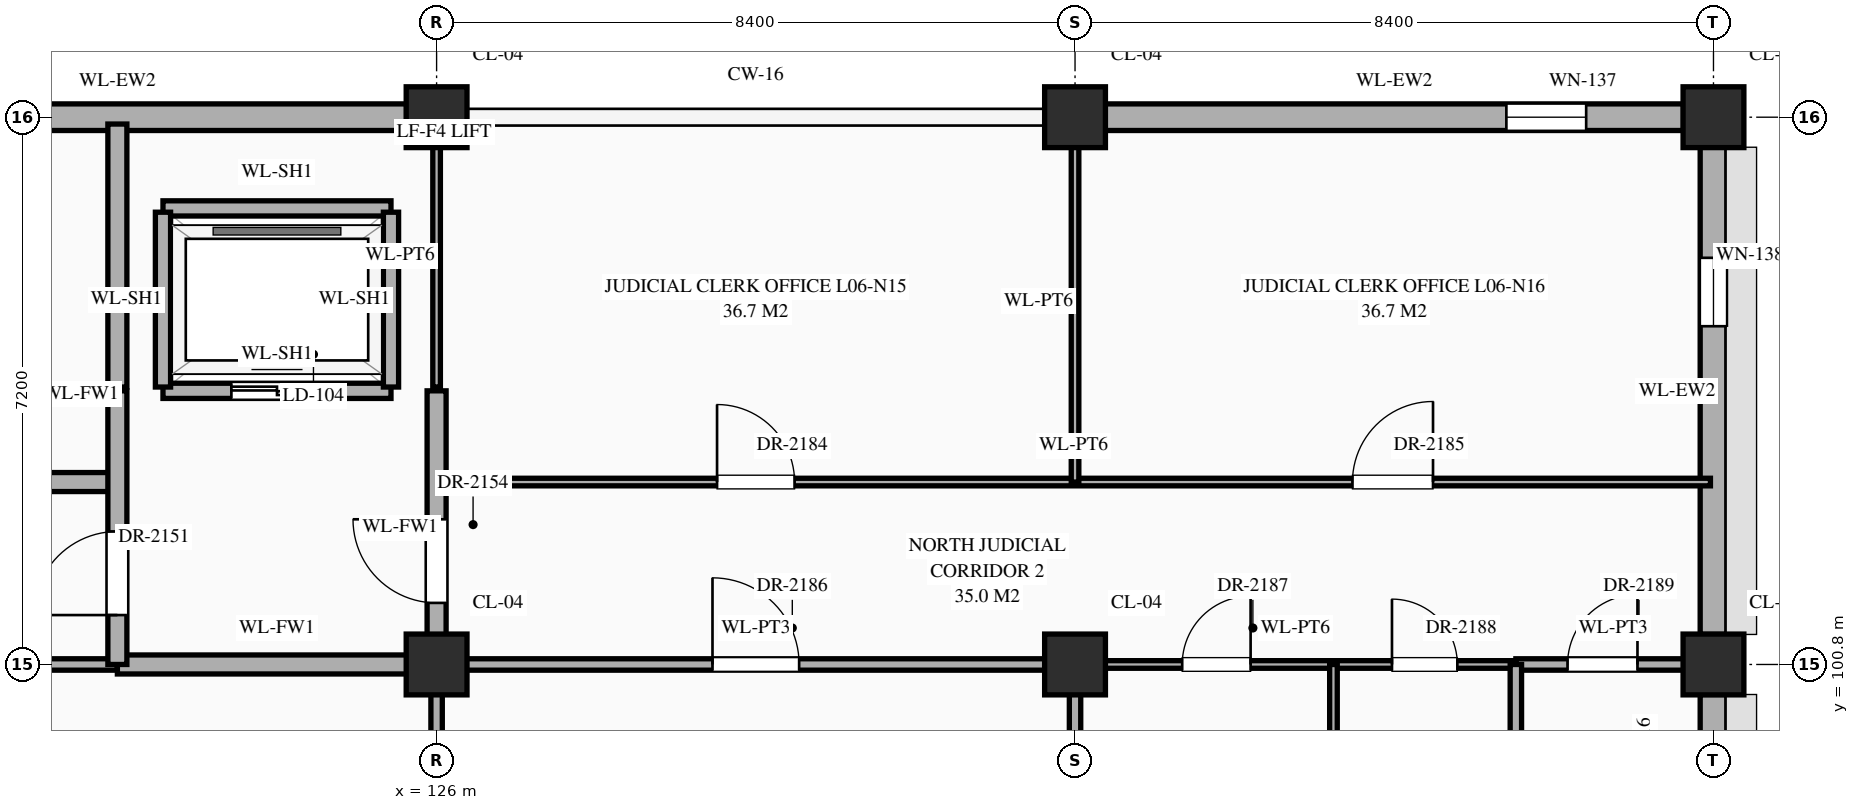
"""IFC4 building model, lengths in metres.
Left out: names, types, materials, properties, quantities, classifications, styles, units other than length and angle.
Written with IfcOpenShell. Run it as: python <this file> out.ifc"""

import sys

from ifc_helpers import new_model, si_unit, direction, frame, frame_2d, origin, origin_2d, place, context, subcontext, project, spatial, rectangle, extrude, element, fill, save


model = new_model("IFC4")
c1 = context("Model", 3, precision=1e-05, world=origin(), true_north=direction((0.0, 1.0)))
c2 = subcontext(c1, "Body", "Model", "MODEL_VIEW")
j1 = project(units=[si_unit("LENGTHUNIT", "METRE"), si_unit("PLANEANGLEUNIT", "RADIAN")], contexts=[c1])
p1 = place(None, origin())
s1 = spatial("IfcSite", under=j1, at=p1, CompositionType="ELEMENT")
p2 = place(p1, origin())
s2 = spatial("IfcBuilding", under=s1, at=p2, CompositionType="ELEMENT")
p3 = place(p2, frame((0.0, 0.0, 26.1)))
s3 = spatial("IfcBuildingStorey", under=s2, at=p3, CompositionType="ELEMENT", Elevation=26.1)
for number, where, z_axis, x_axis in (
    (1, (126.0, 100.8, 0.0), (0.0, 0.0, 1.0), (1.0, 0.0, 0.0)),
    (2, (126.0, 108.0, 0.0), (0.0, 0.0, 1.0), (1.0, 0.0, 0.0)),
    (3, (134.4, 100.8, 0.0), (0.0, 0.0, 1.0), (1.0, 0.0, 0.0)),
    (4, (134.4, 108.0, 0.0), (0.0, 0.0, 1.0), (1.0, 0.0, 0.0)),
    (5, (142.8, 100.8, 0.0), (0.0, 0.0, 1.0), (1.0, 0.0, 0.0)),
    (6, (142.8, 108.0, 0.0), (0.0, 0.0, 1.0), (1.0, 0.0, 0.0)),
):
    element("IfcColumn", number, at=place(p3, frame(where, z_axis=z_axis, x_axis=x_axis)), inside=s3, PredefinedType="COLUMN", context=c2, shape_type="SweptSolid", body=[
        extrude(rectangle(XDim=0.8, YDim=0.8, at=origin_2d()), origin(), (0.0, 0.0, 1.0), 4.5),
    ])
p4 = place(p3, frame((117.995, 108.0, 0.0), z_axis=(0.0, 0.0, 1.0), x_axis=(1.0, 0.0, 0.0)))
e7 = element("IfcWall", 7, at=p4, inside=s3, PredefinedType="STANDARD", context=c2, shape_type="SweptSolid", body=[
    extrude(rectangle(XDim=7.61, YDim=0.35, at=frame_2d((3.805, 0.0))), origin(), (0.0, 0.0, 1.0), 3.59),
])
p5 = place(p3, frame((142.8, 93.995, 0.0), z_axis=(0.0, 0.0, 1.0), x_axis=(0.0, 1.0, 0.0)))
e8 = element("IfcWall", 8, at=p5, inside=s3, PredefinedType="STANDARD", context=c2, shape_type="SweptSolid", body=[
    extrude(rectangle(XDim=6.41, YDim=0.35, at=frame_2d((3.205, 0.0))), origin(), (0.0, 0.0, 1.0), 3.59),
])
p6 = place(p5, frame((4.055, 0.0, 0.85)))
e9 = element("IfcOpeningElement", 9, at=p6, cuts=e8, PredefinedType="OPENING", context=c2, shape_type="SweptSolid", body=[
    extrude(rectangle(XDim=0.9, YDim=1.2, at=frame_2d((0.45, 0.6))), frame((0.0, 0.187, 0.0), z_axis=(0.0, -1.0, 0.0), x_axis=(1.0, 0.0, 0.0)), (0.0, 0.0, 1.0), 0.374),
])
p7 = place(p3, frame((134.795, 108.0, 0.0), z_axis=(0.0, 0.0, 1.0), x_axis=(1.0, 0.0, 0.0)))
e10 = element("IfcWall", 10, at=p7, inside=s3, PredefinedType="STANDARD", context=c2, shape_type="SweptSolid", body=[
    extrude(rectangle(XDim=7.61, YDim=0.35, at=frame_2d((3.805, 0.0))), origin(), (0.0, 0.0, 1.0), 3.59),
])
p8 = place(p7, frame((5.28, 0.0, 0.85)))
e11 = element("IfcOpeningElement", 11, at=p8, cuts=e10, PredefinedType="OPENING", context=c2, shape_type="SweptSolid", body=[
    extrude(rectangle(XDim=1.05, YDim=1.92, at=frame_2d((0.525, 0.96))), frame((0.0, 0.187, 0.0), z_axis=(0.0, -1.0, 0.0), x_axis=(1.0, 0.0, 0.0)), (0.0, 0.0, 1.0), 0.374),
])
p9 = place(p3, frame((142.8, 101.195, 0.0), z_axis=(0.0, 0.0, 1.0), x_axis=(0.0, 1.0, 0.0)))
e12 = element("IfcWall", 12, at=p9, inside=s3, PredefinedType="STANDARD", context=c2, shape_type="SweptSolid", body=[
    extrude(rectangle(XDim=6.41, YDim=0.35, at=frame_2d((3.205, 0.0))), origin(), (0.0, 0.0, 1.0), 3.59),
])
p10 = place(p9, frame((4.055, 0.0, 0.85)))
e13 = element("IfcOpeningElement", 13, at=p10, cuts=e12, PredefinedType="OPENING", context=c2, shape_type="SweptSolid", body=[
    extrude(rectangle(XDim=0.9, YDim=1.38, at=frame_2d((0.45, 0.69))), frame((0.0, 0.187, 0.0), z_axis=(0.0, -1.0, 0.0), x_axis=(1.0, 0.0, 0.0)), (0.0, 0.0, 1.0), 0.374),
])
p11 = place(p3, frame((117.6, 100.8, 0.0), z_axis=(0.0, 0.0, 1.0), x_axis=(1.0, 0.0, 0.0)))
e14 = element("IfcWall", 14, at=p11, inside=s3, PredefinedType="STANDARD", context=c2, shape_type="SweptSolid", body=[
    extrude(rectangle(XDim=4.2, YDim=0.15, at=frame_2d((2.1, 0.0))), origin(), (0.0, 0.0, 1.0), 3.39),
])
p12 = place(p11, frame((1.81, 0.0, 0.0)))
e15 = element("IfcOpeningElement", 15, at=p12, cuts=e14, PredefinedType="OPENING", context=c2, shape_type="SweptSolid", body=[
    extrude(rectangle(XDim=0.9, YDim=2.15, at=frame_2d((0.45, 1.075))), frame((0.0, 0.087, 0.0), z_axis=(0.0, -1.0, 0.0), x_axis=(1.0, 0.0, 0.0)), (0.0, 0.0, 1.0), 0.174),
])
p13 = place(p3, frame((121.8, 100.8, 0.0), z_axis=(0.0, 0.0, 1.0), x_axis=(1.0, 0.0, 0.0)))
e16 = element("IfcWall", 16, at=p13, inside=s3, PredefinedType="STANDARD", context=c2, shape_type="SweptSolid", body=[
    extrude(rectangle(XDim=4.2, YDim=0.25, at=frame_2d((2.1, 0.0))), origin(), (0.0, 0.0, 1.0), 3.39),
])
p14 = place(p3, frame((126.0, 100.8, 0.0), z_axis=(0.0, 0.0, 1.0), x_axis=(1.0, 0.0, 0.0)))
e17 = element("IfcWall", 17, at=p14, inside=s3, PredefinedType="STANDARD", context=c2, shape_type="SweptSolid", body=[
    extrude(rectangle(XDim=8.4, YDim=0.15, at=frame_2d((4.2, 0.0))), origin(), (0.0, 0.0, 1.0), 3.39),
])
p15 = place(p14, frame((3.63, 0.0, 0.0)))
e18 = element("IfcOpeningElement", 18, at=p15, cuts=e17, PredefinedType="OPENING", context=c2, shape_type="SweptSolid", body=[
    extrude(rectangle(XDim=1.14, YDim=2.4, at=frame_2d((0.57, 1.2))), frame((0.0, 0.087, 0.0), z_axis=(0.0, -1.0, 0.0), x_axis=(1.0, 0.0, 0.0)), (0.0, 0.0, 1.0), 0.174),
])
p16 = place(p3, frame((134.4, 100.8, 0.0), z_axis=(0.0, 0.0, 1.0), x_axis=(1.0, 0.0, 0.0)))
e19 = element("IfcWall", 19, at=p16, inside=s3, PredefinedType="STANDARD", context=c2, shape_type="SweptSolid", body=[
    extrude(rectangle(XDim=5.8, YDim=0.1, at=frame_2d((2.9, 0.0))), origin(), (0.0, 0.0, 1.0), 3.39),
])
p17 = place(p16, frame((1.41, 0.0, 0.0)))
e20 = element("IfcOpeningElement", 20, at=p17, cuts=e19, PredefinedType="OPENING", context=c2, shape_type="SweptSolid", body=[
    extrude(rectangle(XDim=0.9, YDim=2.15, at=frame_2d((0.45, 1.075))), frame((0.0, 0.062, 0.0), z_axis=(0.0, -1.0, 0.0), x_axis=(1.0, 0.0, 0.0)), (0.0, 0.0, 1.0), 0.124),
])
p18 = place(p16, frame((4.17, 0.0, 0.0)))
e21 = element("IfcOpeningElement", 21, at=p18, cuts=e19, PredefinedType="OPENING", context=c2, shape_type="SweptSolid", body=[
    extrude(rectangle(XDim=0.86, YDim=2.1, at=frame_2d((0.43, 1.05))), frame((0.0, 0.062, 0.0), z_axis=(0.0, -1.0, 0.0), x_axis=(1.0, 0.0, 0.0)), (0.0, 0.0, 1.0), 0.124),
])
p19 = place(p3, frame((140.2, 100.8, 0.0), z_axis=(0.0, 0.0, 1.0), x_axis=(1.0, 0.0, 0.0)))
e22 = element("IfcWall", 22, at=p19, inside=s3, PredefinedType="STANDARD", context=c2, shape_type="SweptSolid", body=[
    extrude(rectangle(XDim=2.56, YDim=0.15, at=frame_2d((1.28, 0.0))), origin(), (0.0, 0.0, 1.0), 3.39),
])
p20 = place(p19, frame((0.68, 0.0, 0.0)))
e23 = element("IfcOpeningElement", 23, at=p20, cuts=e22, PredefinedType="OPENING", context=c2, shape_type="SweptSolid", body=[
    extrude(rectangle(XDim=0.92, YDim=2.15, at=frame_2d((0.46, 1.075))), frame((0.0, 0.087, 0.0), z_axis=(0.0, -1.0, 0.0), x_axis=(1.0, 0.0, 0.0)), (0.0, 0.0, 1.0), 0.174),
])
p21 = place(p3, frame((117.6, 103.2, 0.0), z_axis=(0.0, 0.0, 1.0), x_axis=(1.0, 0.0, 0.0)))
e24 = element("IfcWall", 24, at=p21, inside=s3, PredefinedType="STANDARD", context=c2, shape_type="SweptSolid", body=[
    extrude(rectangle(XDim=4.2, YDim=0.25, at=frame_2d((2.1, 0.0))), origin(), (0.0, 0.0, 1.0), 4.24),
])
p22 = place(p21, frame((1.625, 0.0, 0.0)))
e25 = element("IfcOpeningElement", 25, at=p22, cuts=e24, PredefinedType="OPENING", context=c2, shape_type="SweptSolid", body=[
    extrude(rectangle(XDim=0.95, YDim=2.15, at=frame_2d((0.475, 1.075))), frame((0.0, 0.137, 0.0), z_axis=(0.0, -1.0, 0.0), x_axis=(1.0, 0.0, 0.0)), (0.0, 0.0, 1.0), 0.274),
])
p23 = place(p3, frame((126.0, 103.2, 0.0), z_axis=(0.0, 0.0, 1.0), x_axis=(1.0, 0.0, 0.0)))
e26 = element("IfcWall", 26, at=p23, inside=s3, PredefinedType="STANDARD", context=c2, shape_type="SweptSolid", body=[
    extrude(rectangle(XDim=16.76, YDim=0.1, at=frame_2d((8.38, 0.0))), origin(), (0.0, 0.0, 1.0), 4.24),
])
p24 = place(p23, frame((3.69, 0.0, 0.0)))
e27 = element("IfcOpeningElement", 27, at=p24, cuts=e26, PredefinedType="OPENING", context=c2, shape_type="SweptSolid", body=[
    extrude(rectangle(XDim=1.02, YDim=2.4, at=frame_2d((0.51, 1.2))), frame((0.0, 0.062, 0.0), z_axis=(0.0, -1.0, 0.0), x_axis=(1.0, 0.0, 0.0)), (0.0, 0.0, 1.0), 0.124),
])
p25 = place(p23, frame((12.05, 0.0, 0.0)))
e28 = element("IfcOpeningElement", 28, at=p25, cuts=e26, PredefinedType="OPENING", context=c2, shape_type="SweptSolid", body=[
    extrude(rectangle(XDim=1.06, YDim=2.4, at=frame_2d((0.53, 1.2))), frame((0.0, 0.062, 0.0), z_axis=(0.0, -1.0, 0.0), x_axis=(1.0, 0.0, 0.0)), (0.0, 0.0, 1.0), 0.124),
])
p26 = place(p3, frame((122.4, 104.4, 0.0), z_axis=(0.0, 0.0, 1.0), x_axis=(1.0, 0.0, 0.0)))
e29 = element("IfcWall", 29, at=p26, inside=s3, PredefinedType="STANDARD", context=c2, shape_type="SweptSolid", body=[
    extrude(rectangle(XDim=3.0, YDim=0.2, at=frame_2d((1.5, 0.0))), origin(), (0.0, 0.0, 1.0), 4.24),
])
p27 = place(p26, frame((0.9, 0.0, 0.0)))
e30 = element("IfcOpeningElement", 30, at=p27, cuts=e29, PredefinedType="OPENING", context=c2, shape_type="SweptSolid", body=[
    extrude(rectangle(XDim=1.2, YDim=2.15, at=frame_2d((0.6, 1.075))), frame((0.0, 0.112, 0.0), z_axis=(0.0, -1.0, 0.0), x_axis=(1.0, 0.0, 0.0)), (0.0, 0.0, 1.0), 0.224),
])
p28 = place(p3, frame((122.4, 106.8, 0.0), z_axis=(0.0, 0.0, 1.0), x_axis=(1.0, 0.0, 0.0)))
e31 = element("IfcWall", 31, at=p28, inside=s3, PredefinedType="STANDARD", context=c2, shape_type="SweptSolid", body=[
    extrude(rectangle(XDim=3.0, YDim=0.2, at=frame_2d((1.5, 0.0))), origin(), (0.0, 0.0, 1.0), 4.24),
])
p29 = place(p3, frame((121.8, 100.8, 0.0), z_axis=(0.0, 0.0, 1.0), x_axis=(0.0, 1.0, 0.0)))
e32 = element("IfcWall", 32, at=p29, inside=s3, PredefinedType="STANDARD", context=c2, shape_type="SweptSolid", body=[
    extrude(rectangle(XDim=3.6, YDim=0.25, at=frame_2d((1.8, 0.0))), origin(), (0.0, 0.0, 1.0), 3.89),
])
p30 = place(p29, frame((0.65, 0.0, 0.0)))
e33 = element("IfcOpeningElement", 33, at=p30, cuts=e32, PredefinedType="OPENING", context=c2, shape_type="SweptSolid", body=[
    extrude(rectangle(XDim=1.1, YDim=2.2, at=frame_2d((0.55, 1.1))), frame((0.0, 0.137, 0.0), z_axis=(0.0, -1.0, 0.0), x_axis=(1.0, 0.0, 0.0)), (0.0, 0.0, 1.0), 0.274),
])
p31 = place(p3, frame((121.8, 104.45, 0.0), z_axis=(0.0, 0.0, 1.0), x_axis=(0.0, 1.0, 0.0)))
e34 = element("IfcWall", 34, at=p31, inside=s3, PredefinedType="STANDARD", context=c2, shape_type="SweptSolid", body=[
    extrude(rectangle(XDim=3.46, YDim=0.25, at=frame_2d((1.73, 0.0))), origin(), (0.0, 0.0, 1.0), 3.89),
])
for number, where, z_axis, x_axis in (
    (35, (122.4, 104.45, 0.0), (0.0, 0.0, 1.0), (0.0, 1.0, 0.0)),
    (36, (125.4, 104.45, 0.0), (0.0, 0.0, 1.0), (0.0, 1.0, 0.0)),
):
    element("IfcWall", number, at=place(p3, frame(where, z_axis=z_axis, x_axis=x_axis)), inside=s3, PredefinedType="STANDARD", context=c2, shape_type="SweptSolid", body=[
        extrude(rectangle(XDim=2.3, YDim=0.2, at=frame_2d((1.15, 0.0))), origin(), (0.0, 0.0, 1.0), 4.24),
    ])
p32 = place(p3, frame((126.0, 96.0, 0.0), z_axis=(0.0, 0.0, 1.0), x_axis=(0.0, 1.0, 0.0)))
e37 = element("IfcWall", 37, at=p32, inside=s3, PredefinedType="STANDARD", context=c2, shape_type="SweptSolid", body=[
    extrude(rectangle(XDim=4.8, YDim=0.15, at=frame_2d((2.4, 0.0))), origin(), (0.0, 0.0, 1.0), 3.49),
])
p33 = place(p3, frame((126.0, 100.8, 0.0), z_axis=(0.0, 0.0, 1.0), x_axis=(0.0, 1.0, 0.0)))
e38 = element("IfcWall", 38, at=p33, inside=s3, PredefinedType="STANDARD", context=c2, shape_type="SweptSolid", body=[
    extrude(rectangle(XDim=3.6, YDim=0.25, at=frame_2d((1.8, 0.0))), origin(), (0.0, 0.0, 1.0), 3.49),
])
p34 = place(p33, frame((0.81, 0.0, 0.0)))
e39 = element("IfcOpeningElement", 39, at=p34, cuts=e38, PredefinedType="OPENING", context=c2, shape_type="SweptSolid", body=[
    extrude(rectangle(XDim=1.1, YDim=2.2, at=frame_2d((0.55, 1.1))), frame((0.0, 0.137, 0.0), z_axis=(0.0, -1.0, 0.0), x_axis=(1.0, 0.0, 0.0)), (0.0, 0.0, 1.0), 0.274),
])
p35 = place(p3, frame((126.0, 104.45, 0.0), z_axis=(0.0, 0.0, 1.0), x_axis=(0.0, 1.0, 0.0)))
e40 = element("IfcWall", 40, at=p35, inside=s3, PredefinedType="STANDARD", context=c2, shape_type="SweptSolid", body=[
    extrude(rectangle(XDim=3.46, YDim=0.1, at=frame_2d((1.73, 0.0))), origin(), (0.0, 0.0, 1.0), 3.49),
])
p36 = place(p3, frame((134.4, 96.0, 0.0), z_axis=(0.0, 0.0, 1.0), x_axis=(0.0, 1.0, 0.0)))
e41 = element("IfcWall", 41, at=p36, inside=s3, PredefinedType="STANDARD", context=c2, shape_type="SweptSolid", body=[
    extrude(rectangle(XDim=4.8, YDim=0.15, at=frame_2d((2.4, 0.0))), origin(), (0.0, 0.0, 1.0), 4.24),
])
p37 = place(p3, frame((134.4, 103.2, 0.0), z_axis=(0.0, 0.0, 1.0), x_axis=(0.0, 1.0, 0.0)))
e42 = element("IfcWall", 42, at=p37, inside=s3, PredefinedType="STANDARD", context=c2, shape_type="SweptSolid", body=[
    extrude(rectangle(XDim=4.76, YDim=0.1, at=frame_2d((2.38, 0.0))), origin(), (0.0, 0.0, 1.0), 3.49),
])
p38 = place(p3, frame((137.8, 96.0, 0.0), z_axis=(0.0, 0.0, 1.0), x_axis=(0.0, 1.0, 0.0)))
e43 = element("IfcWall", 43, at=p38, inside=s3, PredefinedType="STANDARD", context=c2, shape_type="SweptSolid", body=[
    extrude(rectangle(XDim=4.8, YDim=0.1, at=frame_2d((2.4, 0.0))), origin(), (0.0, 0.0, 1.0), 4.24),
])
p39 = place(p38, frame((1.8, 0.0, 0.0)))
e44 = element("IfcOpeningElement", 44, at=p39, cuts=e43, PredefinedType="OPENING", context=c2, shape_type="SweptSolid", body=[
    extrude(rectangle(XDim=1.2, YDim=2.35, at=frame_2d((0.6, 1.175))), frame((0.0, 0.062, 0.0), z_axis=(0.0, -1.0, 0.0), x_axis=(1.0, 0.0, 0.0)), (0.0, 0.0, 1.0), 0.124),
])
p40 = place(p3, frame((140.2, 96.0, 0.0), z_axis=(0.0, 0.0, 1.0), x_axis=(0.0, 1.0, 0.0)))
e45 = element("IfcWall", 45, at=p40, inside=s3, PredefinedType="STANDARD", context=c2, shape_type="SweptSolid", body=[
    extrude(rectangle(XDim=4.8, YDim=0.15, at=frame_2d((2.4, 0.0))), origin(), (0.0, 0.0, 1.0), 4.24),
])
p41 = place(p40, frame((1.78, 0.0, 0.0)))
e46 = element("IfcOpeningElement", 46, at=p41, cuts=e45, PredefinedType="OPENING", context=c2, shape_type="SweptSolid", body=[
    extrude(rectangle(XDim=1.24, YDim=2.3, at=frame_2d((0.62, 1.15))), frame((0.0, 0.087, 0.0), z_axis=(0.0, -1.0, 0.0), x_axis=(1.0, 0.0, 0.0)), (0.0, 0.0, 1.0), 0.174),
])
p42 = place(p8, origin())
e47 = element("IfcWindow", 47, at=p42, inside=s3, PartitioningType="SINGLE_PANEL", PredefinedType="WINDOW", context=c2, shape_type="SweptSolid", body=[
    extrude(rectangle(XDim=1.05, YDim=1.92, at=frame_2d((0.525, 0.96))), frame((0.0, 0.03, 0.0), z_axis=(0.0, -1.0, 0.0), x_axis=(1.0, 0.0, 0.0)), (0.0, 0.0, 1.0), 0.06),
])
fill(e11, e47)
p43 = place(p10, origin())
e48 = element("IfcWindow", 48, at=p43, inside=s3, PartitioningType="SINGLE_PANEL", PredefinedType="WINDOW", context=c2, shape_type="SweptSolid", body=[
    extrude(rectangle(XDim=0.9, YDim=1.38, at=frame_2d((0.45, 0.69))), frame((0.0, 0.03, 0.0), z_axis=(0.0, -1.0, 0.0), x_axis=(1.0, 0.0, 0.0)), (0.0, 0.0, 1.0), 0.06),
])
fill(e13, e48)
p44 = place(p27, origin())
e49 = element("IfcDoor", 49, at=p44, inside=s3, OperationType="DOUBLE_DOOR_SLIDING", PredefinedType="DOOR", context=c2, shape_type="SweptSolid", body=[
    extrude(rectangle(XDim=1.2, YDim=2.15, at=frame_2d((0.6, 1.075))), frame((0.0, 0.025, 0.0), z_axis=(0.0, -1.0, 0.0), x_axis=(1.0, 0.0, 0.0)), (0.0, 0.0, 1.0), 0.05),
])
fill(e30, e49)
p45 = place(p30, origin())
e50 = element("IfcDoor", 50, at=p45, inside=s3, OperationType="SINGLE_SWING_LEFT", PredefinedType="DOOR", context=c2, shape_type="SweptSolid", body=[
    extrude(rectangle(XDim=1.1, YDim=2.2, at=frame_2d((0.55, 1.1))), frame((0.0, 0.025, 0.0), z_axis=(0.0, -1.0, 0.0), x_axis=(1.0, 0.0, 0.0)), (0.0, 0.0, 1.0), 0.05),
])
fill(e33, e50)
p46 = place(p34, origin())
e51 = element("IfcDoor", 51, at=p46, inside=s3, OperationType="SINGLE_SWING_RIGHT", PredefinedType="DOOR", context=c2, shape_type="SweptSolid", body=[
    extrude(rectangle(XDim=1.1, YDim=2.2, at=frame_2d((0.55, 1.1))), frame((0.0, 0.025, 0.0), z_axis=(0.0, -1.0, 0.0), x_axis=(1.0, 0.0, 0.0)), (0.0, 0.0, 1.0), 0.05),
])
fill(e39, e51)
p47 = place(p24, origin())
e52 = element("IfcDoor", 52, at=p47, inside=s3, OperationType="SINGLE_SWING_LEFT", PredefinedType="DOOR", context=c2, shape_type="SweptSolid", body=[
    extrude(rectangle(XDim=1.02, YDim=2.4, at=frame_2d((0.51, 1.2))), frame((0.0, 0.025, 0.0), z_axis=(0.0, -1.0, 0.0), x_axis=(1.0, 0.0, 0.0)), (0.0, 0.0, 1.0), 0.05),
])
fill(e27, e52)
p48 = place(p25, origin())
e53 = element("IfcDoor", 53, at=p48, inside=s3, OperationType="SINGLE_SWING_RIGHT", PredefinedType="DOOR", context=c2, shape_type="SweptSolid", body=[
    extrude(rectangle(XDim=1.06, YDim=2.4, at=frame_2d((0.53, 1.2))), frame((0.0, 0.025, 0.0), z_axis=(0.0, -1.0, 0.0), x_axis=(1.0, 0.0, 0.0)), (0.0, 0.0, 1.0), 0.05),
])
fill(e28, e53)
p49 = place(p15, origin())
e54 = element("IfcDoor", 54, at=p49, inside=s3, OperationType="SINGLE_SWING_LEFT", PredefinedType="DOOR", context=c2, shape_type="SweptSolid", body=[
    extrude(rectangle(XDim=1.14, YDim=2.4, at=frame_2d((0.57, 1.2))), frame((0.0, 0.025, 0.0), z_axis=(0.0, -1.0, 0.0), x_axis=(1.0, 0.0, 0.0)), (0.0, 0.0, 1.0), 0.05),
])
fill(e18, e54)
p50 = place(p17, origin())
e55 = element("IfcDoor", 55, at=p50, inside=s3, OperationType="SINGLE_SWING_RIGHT", PredefinedType="DOOR", context=c2, shape_type="SweptSolid", body=[
    extrude(rectangle(XDim=0.9, YDim=2.15, at=frame_2d((0.45, 1.075))), frame((0.0, 0.025, 0.0), z_axis=(0.0, -1.0, 0.0), x_axis=(1.0, 0.0, 0.0)), (0.0, 0.0, 1.0), 0.05),
])
fill(e20, e55)
p51 = place(p18, origin())
e56 = element("IfcDoor", 56, at=p51, inside=s3, OperationType="SINGLE_SWING_LEFT", PredefinedType="DOOR", context=c2, shape_type="SweptSolid", body=[
    extrude(rectangle(XDim=0.86, YDim=2.1, at=frame_2d((0.43, 1.05))), frame((0.0, 0.025, 0.0), z_axis=(0.0, -1.0, 0.0), x_axis=(1.0, 0.0, 0.0)), (0.0, 0.0, 1.0), 0.05),
])
fill(e21, e56)
p52 = place(p20, origin())
e57 = element("IfcDoor", 57, at=p52, inside=s3, OperationType="SINGLE_SWING_RIGHT", PredefinedType="DOOR", context=c2, shape_type="SweptSolid", body=[
    extrude(rectangle(XDim=0.92, YDim=2.15, at=frame_2d((0.46, 1.075))), frame((0.0, 0.025, 0.0), z_axis=(0.0, -1.0, 0.0), x_axis=(1.0, 0.0, 0.0)), (0.0, 0.0, 1.0), 0.05),
])
fill(e23, e57)
save(model, sys.argv[1])
